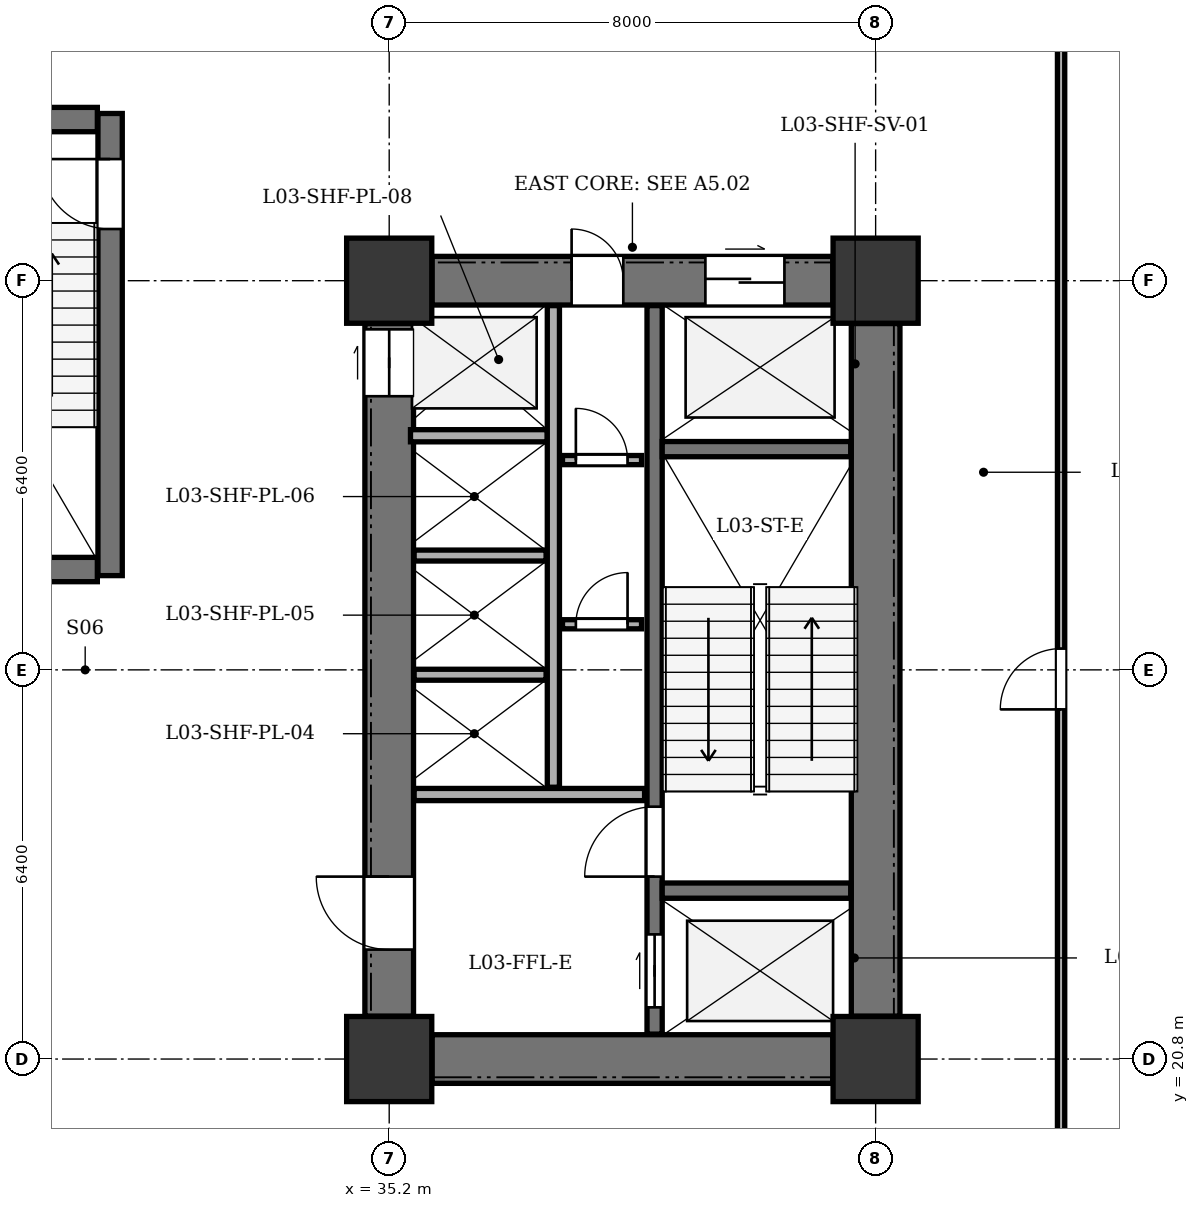
"""IFC4 building model, lengths in metres.
Left out: names, types, materials, properties, quantities, classifications, styles, units other than length and angle.
Written with IfcOpenShell. Run it as: python <this file> out.ifc"""

import sys

from ifc_helpers import new_model, si_unit, direction, frame, frame_2d, origin, origin_2d, place, context, subcontext, project, spatial, rectangle, extrude, element, fill, save


model = new_model("IFC4")
c1 = context("Model", 3, precision=1e-05, world=origin(), true_north=direction((0.0, 1.0)))
c2 = subcontext(c1, "Body", "Model", "MODEL_VIEW")
j1 = project(units=[si_unit("LENGTHUNIT", "METRE"), si_unit("PLANEANGLEUNIT", "RADIAN")], contexts=[c1])
p1 = place(None, origin())
s1 = spatial("IfcSite", under=j1, at=p1, CompositionType="ELEMENT")
p2 = place(p1, origin())
s2 = spatial("IfcBuilding", under=s1, at=p2, CompositionType="ELEMENT")
p3 = place(p2, frame((0.0, 0.0, 14.4)))
s3 = spatial("IfcBuildingStorey", under=s2, at=p3, CompositionType="ELEMENT", Elevation=14.4)
for number, where, z_axis, x_axis in (
    (1, (35.2, 20.8, 0.0), (0.0, 0.0, 1.0), (1.0, 0.0, 0.0)),
    (2, (43.2, 20.8, 0.0), (0.0, 0.0, 1.0), (1.0, 0.0, 0.0)),
    (3, (35.2, 33.6, 0.0), (0.0, 0.0, 1.0), (1.0, 0.0, 0.0)),
    (4, (43.2, 33.6, 0.0), (0.0, 0.0, 1.0), (1.0, 0.0, 0.0)),
):
    element("IfcColumn", number, at=place(p3, frame(where, z_axis=z_axis, x_axis=x_axis)), inside=s3, PredefinedType="COLUMN", context=c2, shape_type="SweptSolid", body=[
        extrude(rectangle(XDim=1.4, YDim=1.4, at=origin_2d()), origin(), (0.0, 0.0, 1.0), 4.5),
    ])
p4 = place(p3, frame((43.2, 21.505, 0.0), z_axis=(0.0, 0.0, 1.0), x_axis=(0.0, 1.0, 0.0)))
e5 = element("IfcWall", 5, at=p4, inside=s3, PredefinedType="SHEAR", context=c2, shape_type="SweptSolid", body=[
    extrude(rectangle(XDim=11.39, YDim=0.8, at=frame_2d((5.695, 0.0))), origin(), (0.0, 0.0, 1.0), 4.0),
])
p5 = place(p3, frame((35.905, 20.8, 0.0), z_axis=(0.0, 0.0, 1.0), x_axis=(1.0, 0.0, 0.0)))
e6 = element("IfcWall", 6, at=p5, inside=s3, PredefinedType="SHEAR", context=c2, shape_type="SweptSolid", body=[
    extrude(rectangle(XDim=6.59, YDim=0.8, at=frame_2d((3.295, 0.0))), origin(), (0.0, 0.0, 1.0), 4.0),
])
p6 = place(p3, frame((35.905, 33.6, 0.0), z_axis=(0.0, 0.0, 1.0), x_axis=(1.0, 0.0, 0.0)))
e7 = element("IfcWall", 7, at=p6, inside=s3, PredefinedType="SHEAR", context=c2, shape_type="SweptSolid", body=[
    extrude(rectangle(XDim=6.59, YDim=0.8, at=frame_2d((3.295, 0.0))), origin(), (0.0, 0.0, 1.0), 4.0),
])
p7 = place(p6, frame((4.495, 0.0, 0.0)))
e8 = element("IfcOpeningElement", 8, at=p7, cuts=e7, PredefinedType="OPENING", context=c2, shape_type="SweptSolid", body=[
    extrude(rectangle(XDim=1.3, YDim=2.15, at=frame_2d((0.65, 1.075))), frame((0.0, 0.41, 0.0), z_axis=(0.0, -1.0, 0.0), x_axis=(1.0, 0.0, 0.0)), (0.0, 0.0, 1.0), 0.82),
])
p8 = place(p6, frame((2.295, 0.0, 0.0)))
e9 = element("IfcOpeningElement", 9, at=p8, cuts=e7, PredefinedType="OPENING", context=c2, shape_type="SweptSolid", body=[
    extrude(rectangle(XDim=0.85, YDim=2.02, at=frame_2d((0.425, 1.01))), frame((0.0, 0.41, 0.0), z_axis=(0.0, -1.0, 0.0), x_axis=(1.0, 0.0, 0.0)), (0.0, 0.0, 1.0), 0.82),
])
p9 = place(p3, frame((35.2, 21.505, 0.0), z_axis=(0.0, 0.0, 1.0), x_axis=(0.0, 1.0, 0.0)))
e10 = element("IfcWall", 10, at=p9, inside=s3, PredefinedType="SHEAR", context=c2, shape_type="SweptSolid", body=[
    extrude(rectangle(XDim=11.39, YDim=0.8, at=frame_2d((5.695, 0.0))), origin(), (0.0, 0.0, 1.0), 4.0),
])
p10 = place(p9, frame((1.095, 0.0, 0.0)))
e11 = element("IfcOpeningElement", 11, at=p10, cuts=e10, PredefinedType="OPENING", context=c2, shape_type="SweptSolid", body=[
    extrude(rectangle(XDim=1.2, YDim=2.15, at=frame_2d((0.6, 1.075))), frame((0.0, 0.41, 0.0), z_axis=(0.0, -1.0, 0.0), x_axis=(1.0, 0.0, 0.0)), (0.0, 0.0, 1.0), 0.82),
])
p11 = place(p9, frame((10.195, 0.0, 0.0)))
e12 = element("IfcOpeningElement", 12, at=p11, cuts=e10, PredefinedType="OPENING", context=c2, shape_type="SweptSolid", body=[
    extrude(rectangle(XDim=1.1, YDim=2.1, at=frame_2d((0.55, 1.05))), frame((0.0, 0.41, 0.0), z_axis=(0.0, -1.0, 0.0), x_axis=(1.0, 0.0, 0.0)), (0.0, 0.0, 1.0), 0.82),
])
p12 = place(p3, frame((39.565, 21.21, 0.0), z_axis=(0.0, 0.0, 1.0), x_axis=(0.0, 1.0, 0.0)))
e13 = element("IfcWall", 13, at=p12, inside=s3, PredefinedType="SHEAR", context=c2, shape_type="SweptSolid", body=[
    extrude(rectangle(XDim=11.98, YDim=0.25, at=frame_2d((5.99, 0.0))), origin(), (0.0, 0.0, 1.0), 4.0),
])
p13 = place(p12, frame((0.44, 0.0, 0.0)))
e14 = element("IfcOpeningElement", 14, at=p13, cuts=e13, PredefinedType="OPENING", context=c2, shape_type="SweptSolid", body=[
    extrude(rectangle(XDim=1.2, YDim=2.15, at=frame_2d((0.6, 1.075))), frame((0.0, 0.135, 0.0), z_axis=(0.0, -1.0, 0.0), x_axis=(1.0, 0.0, 0.0)), (0.0, 0.0, 1.0), 0.27),
])
p14 = place(p12, frame((2.59, 0.0, 0.0)))
e15 = element("IfcOpeningElement", 15, at=p14, cuts=e13, PredefinedType="OPENING", context=c2, shape_type="SweptSolid", body=[
    extrude(rectangle(XDim=1.15, YDim=2.15, at=frame_2d((0.575, 1.075))), frame((0.0, 0.135, 0.0), z_axis=(0.0, -1.0, 0.0), x_axis=(1.0, 0.0, 0.0)), (0.0, 0.0, 1.0), 0.27),
])
for number, where, z_axis, x_axis in (
    (16, (39.69, 23.57, 0.0), (0.0, 0.0, 1.0), (1.0, 0.0, 0.0)),
    (17, (39.69, 30.83, 0.0), (0.0, 0.0, 1.0), (1.0, 0.0, 0.0)),
):
    element("IfcWall", number, at=place(p3, frame(where, z_axis=z_axis, x_axis=x_axis)), inside=s3, PredefinedType="SHEAR", context=c2, shape_type="SweptSolid", body=[
        extrude(rectangle(XDim=3.1, YDim=0.25, at=frame_2d((1.55, 0.0))), origin(), (0.0, 0.0, 1.0), 4.0),
    ])
p15 = place(p3, frame((35.61, 25.15, 0.0), z_axis=(0.0, 0.0, 1.0), x_axis=(1.0, 0.0, 0.0)))
e18 = element("IfcWall", 18, at=p15, inside=s3, PredefinedType="SOLIDWALL", context=c2, shape_type="SweptSolid", body=[
    extrude(rectangle(XDim=3.79, YDim=0.2, at=frame_2d((1.895, 0.0))), origin(), (0.0, 0.0, 1.0), 4.0),
])
p16 = place(p3, frame((35.55, 31.05, 0.0), z_axis=(0.0, 0.0, 1.0), x_axis=(1.0, 0.0, 0.0)))
e19 = element("IfcWall", 19, at=p16, inside=s3, PredefinedType="SOLIDWALL", context=c2, shape_type="SweptSolid", body=[
    extrude(rectangle(XDim=2.25, YDim=0.2, at=frame_2d((1.125, 0.0))), origin(), (0.0, 0.0, 1.0), 4.0),
])
p17 = place(p3, frame((37.9, 25.27, 0.0), z_axis=(0.0, 0.0, 1.0), x_axis=(0.0, 1.0, 0.0)))
e20 = element("IfcWall", 20, at=p17, inside=s3, PredefinedType="SOLIDWALL", context=c2, shape_type="SweptSolid", body=[
    extrude(rectangle(XDim=7.92, YDim=0.2, at=frame_2d((3.96, 0.0))), origin(), (0.0, 0.0, 1.0), 4.0),
])
for number, where, z_axis, x_axis in (
    (21, (35.61, 27.12, 0.0), (0.0, 0.0, 1.0), (1.0, 0.0, 0.0)),
    (22, (35.61, 29.08, 0.0), (0.0, 0.0, 1.0), (1.0, 0.0, 0.0)),
):
    element("IfcWall", number, at=place(p3, frame(where, z_axis=z_axis, x_axis=x_axis)), inside=s3, PredefinedType="PARTITIONING", context=c2, shape_type="SweptSolid", body=[
        extrude(rectangle(XDim=2.17, YDim=0.18, at=frame_2d((1.085, 0.0))), origin(), (0.0, 0.0, 1.0), 4.0),
    ])
p18 = place(p3, frame((30.61, 28.75, 0.0), z_axis=(0.0, 0.0, 1.0), x_axis=(0.0, 1.0, 0.0)))
e23 = element("IfcWall", 23, at=p18, inside=s3, PredefinedType="SHEAR", context=c2, shape_type="SweptSolid", body=[
    extrude(rectangle(XDim=7.6, YDim=0.4, at=frame_2d((3.8, 0.0))), origin(), (0.0, 0.0, 1.0), 4.0),
])
p19 = place(p18, frame((5.7, 0.0, 0.0)))
e24 = element("IfcOpeningElement", 24, at=p19, cuts=e23, PredefinedType="OPENING", context=c2, shape_type="SweptSolid", body=[
    extrude(rectangle(XDim=1.15, YDim=2.15, at=frame_2d((0.575, 1.075))), frame((0.0, 0.21, 0.0), z_axis=(0.0, -1.0, 0.0), x_axis=(1.0, 0.0, 0.0)), (0.0, 0.0, 1.0), 0.42),
])
for number, where, z_axis, x_axis in (
    (25, (27.2, 28.85, 0.0), (0.0, 0.0, 1.0), (1.0, 0.0, 0.0)),
    (26, (27.2, 36.25, 0.0), (0.0, 0.0, 1.0), (1.0, 0.0, 0.0)),
):
    element("IfcWall", number, at=place(p3, frame(where, z_axis=z_axis, x_axis=x_axis)), inside=s3, PredefinedType="SHEAR", context=c2, shape_type="SweptSolid", body=[
        extrude(rectangle(XDim=3.2, YDim=0.4, at=frame_2d((1.6, 0.0))), origin(), (0.0, 0.0, 1.0), 4.0),
    ])
p20 = place(p3, frame((38.05, 27.95, 0.0), z_axis=(0.0, 0.0, 1.0), x_axis=(1.0, 0.0, 0.0)))
e27 = element("IfcWall", 27, at=p20, inside=s3, PredefinedType="PARTITIONING", context=c2, shape_type="SweptSolid", body=[
    extrude(rectangle(XDim=1.3, YDim=0.15, at=frame_2d((0.65, 0.0))), origin(), (0.0, 0.0, 1.0), 4.0),
])
p21 = place(p20, frame((0.22, 0.0, 0.0)))
e28 = element("IfcOpeningElement", 28, at=p21, cuts=e27, PredefinedType="OPENING", context=c2, shape_type="SweptSolid", body=[
    extrude(rectangle(XDim=0.85, YDim=2.02, at=frame_2d((0.425, 1.01))), frame((0.0, 0.085, 0.0), z_axis=(0.0, -1.0, 0.0), x_axis=(1.0, 0.0, 0.0)), (0.0, 0.0, 1.0), 0.17),
])
p22 = place(p3, frame((38.05, 30.65, 0.0), z_axis=(0.0, 0.0, 1.0), x_axis=(1.0, 0.0, 0.0)))
e29 = element("IfcWall", 29, at=p22, inside=s3, PredefinedType="PARTITIONING", context=c2, shape_type="SweptSolid", body=[
    extrude(rectangle(XDim=1.3, YDim=0.15, at=frame_2d((0.65, 0.0))), origin(), (0.0, 0.0, 1.0), 4.0),
])
p23 = place(p22, frame((0.22, 0.0, 0.0)))
e30 = element("IfcOpeningElement", 30, at=p23, cuts=e29, PredefinedType="OPENING", context=c2, shape_type="SweptSolid", body=[
    extrude(rectangle(XDim=0.85, YDim=2.02, at=frame_2d((0.425, 1.01))), frame((0.0, 0.085, 0.0), z_axis=(0.0, -1.0, 0.0), x_axis=(1.0, 0.0, 0.0)), (0.0, 0.0, 1.0), 0.17),
])
p24 = place(p3, frame((46.25, 18.565, 0.0), z_axis=(0.0, 0.0, 1.0), x_axis=(0.0, 1.0, 0.0)))
e31 = element("IfcWall", 31, at=p24, inside=s3, PredefinedType="PARTITIONING", context=c2, shape_type="SweptSolid", body=[
    extrude(rectangle(XDim=19.72, YDim=0.12, at=frame_2d((9.86, 0.0))), origin(), (0.0, 0.0, 1.0), 4.0),
])
p25 = place(p24, frame((7.985, 0.0, 0.0)))
e32 = element("IfcOpeningElement", 32, at=p25, cuts=e31, PredefinedType="OPENING", context=c2, shape_type="SweptSolid", body=[
    extrude(rectangle(XDim=1.0, YDim=2.1, at=frame_2d((0.5, 1.05))), frame((0.0, 0.07, 0.0), z_axis=(0.0, -1.0, 0.0), x_axis=(1.0, 0.0, 0.0)), (0.0, 0.0, 1.0), 0.14),
])
p26 = place(p7, origin())
e33 = element("IfcDoor", 33, at=p26, inside=s3, OperationType="DOUBLE_DOOR_SLIDING", PredefinedType="DOOR", context=c2, shape_type="SweptSolid", body=[
    extrude(rectangle(XDim=1.3, YDim=2.15, at=frame_2d((0.65, 1.075))), frame((0.0, 0.025, 0.0), z_axis=(0.0, -1.0, 0.0), x_axis=(1.0, 0.0, 0.0)), (0.0, 0.0, 1.0), 0.05),
])
fill(e8, e33)
p27 = place(p8, origin())
e34 = element("IfcDoor", 34, at=p27, inside=s3, OperationType="SINGLE_SWING_LEFT", PredefinedType="DOOR", context=c2, shape_type="SweptSolid", body=[
    extrude(rectangle(XDim=0.85, YDim=2.02, at=frame_2d((0.425, 1.01))), frame((0.0, 0.025, 0.0), z_axis=(0.0, -1.0, 0.0), x_axis=(1.0, 0.0, 0.0)), (0.0, 0.0, 1.0), 0.05),
])
fill(e9, e34)
p28 = place(p10, origin())
e35 = element("IfcDoor", 35, at=p28, inside=s3, OperationType="SINGLE_SWING_RIGHT", PredefinedType="DOOR", context=c2, shape_type="SweptSolid", body=[
    extrude(rectangle(XDim=1.2, YDim=2.15, at=frame_2d((0.6, 1.075))), frame((0.0, 0.025, 0.0), z_axis=(0.0, -1.0, 0.0), x_axis=(1.0, 0.0, 0.0)), (0.0, 0.0, 1.0), 0.05),
])
fill(e11, e35)
p29 = place(p11, origin())
e36 = element("IfcDoor", 36, at=p29, inside=s3, OperationType="DOUBLE_DOOR_SLIDING", PredefinedType="DOOR", context=c2, shape_type="SweptSolid", body=[
    extrude(rectangle(XDim=1.1, YDim=2.1, at=frame_2d((0.55, 1.05))), frame((0.0, 0.025, 0.0), z_axis=(0.0, -1.0, 0.0), x_axis=(1.0, 0.0, 0.0)), (0.0, 0.0, 1.0), 0.05),
])
fill(e12, e36)
p30 = place(p13, origin())
e37 = element("IfcDoor", 37, at=p30, inside=s3, OperationType="DOUBLE_DOOR_SLIDING", PredefinedType="DOOR", context=c2, shape_type="SweptSolid", body=[
    extrude(rectangle(XDim=1.2, YDim=2.15, at=frame_2d((0.6, 1.075))), frame((0.0, 0.025, 0.0), z_axis=(0.0, -1.0, 0.0), x_axis=(1.0, 0.0, 0.0)), (0.0, 0.0, 1.0), 0.05),
])
fill(e14, e37)
p31 = place(p14, origin())
e38 = element("IfcDoor", 38, at=p31, inside=s3, OperationType="SINGLE_SWING_LEFT", PredefinedType="DOOR", context=c2, shape_type="SweptSolid", body=[
    extrude(rectangle(XDim=1.15, YDim=2.15, at=frame_2d((0.575, 1.075))), frame((0.0, 0.025, 0.0), z_axis=(0.0, -1.0, 0.0), x_axis=(1.0, 0.0, 0.0)), (0.0, 0.0, 1.0), 0.05),
])
fill(e15, e38)
p32 = place(p19, origin())
e39 = element("IfcDoor", 39, at=p32, inside=s3, OperationType="SINGLE_SWING_RIGHT", PredefinedType="DOOR", context=c2, shape_type="SweptSolid", body=[
    extrude(rectangle(XDim=1.15, YDim=2.15, at=frame_2d((0.575, 1.075))), frame((0.0, 0.025, 0.0), z_axis=(0.0, -1.0, 0.0), x_axis=(1.0, 0.0, 0.0)), (0.0, 0.0, 1.0), 0.05),
])
fill(e24, e39)
p33 = place(p21, origin())
e40 = element("IfcDoor", 40, at=p33, inside=s3, OperationType="SINGLE_SWING_RIGHT", PredefinedType="DOOR", context=c2, shape_type="SweptSolid", body=[
    extrude(rectangle(XDim=0.85, YDim=2.02, at=frame_2d((0.425, 1.01))), frame((0.0, 0.025, 0.0), z_axis=(0.0, -1.0, 0.0), x_axis=(1.0, 0.0, 0.0)), (0.0, 0.0, 1.0), 0.05),
])
fill(e28, e40)
p34 = place(p23, origin())
e41 = element("IfcDoor", 41, at=p34, inside=s3, OperationType="SINGLE_SWING_LEFT", PredefinedType="DOOR", context=c2, shape_type="SweptSolid", body=[
    extrude(rectangle(XDim=0.85, YDim=2.02, at=frame_2d((0.425, 1.01))), frame((0.0, 0.025, 0.0), z_axis=(0.0, -1.0, 0.0), x_axis=(1.0, 0.0, 0.0)), (0.0, 0.0, 1.0), 0.05),
])
fill(e30, e41)
p35 = place(p25, origin())
e42 = element("IfcDoor", 42, at=p35, inside=s3, OperationType="SINGLE_SWING_LEFT", PredefinedType="DOOR", context=c2, shape_type="SweptSolid", body=[
    extrude(rectangle(XDim=1.0, YDim=2.1, at=frame_2d((0.5, 1.05))), frame((0.0, 0.025, 0.0), z_axis=(0.0, -1.0, 0.0), x_axis=(1.0, 0.0, 0.0)), (0.0, 0.0, 1.0), 0.05),
])
fill(e32, e42)
save(model, sys.argv[1])
